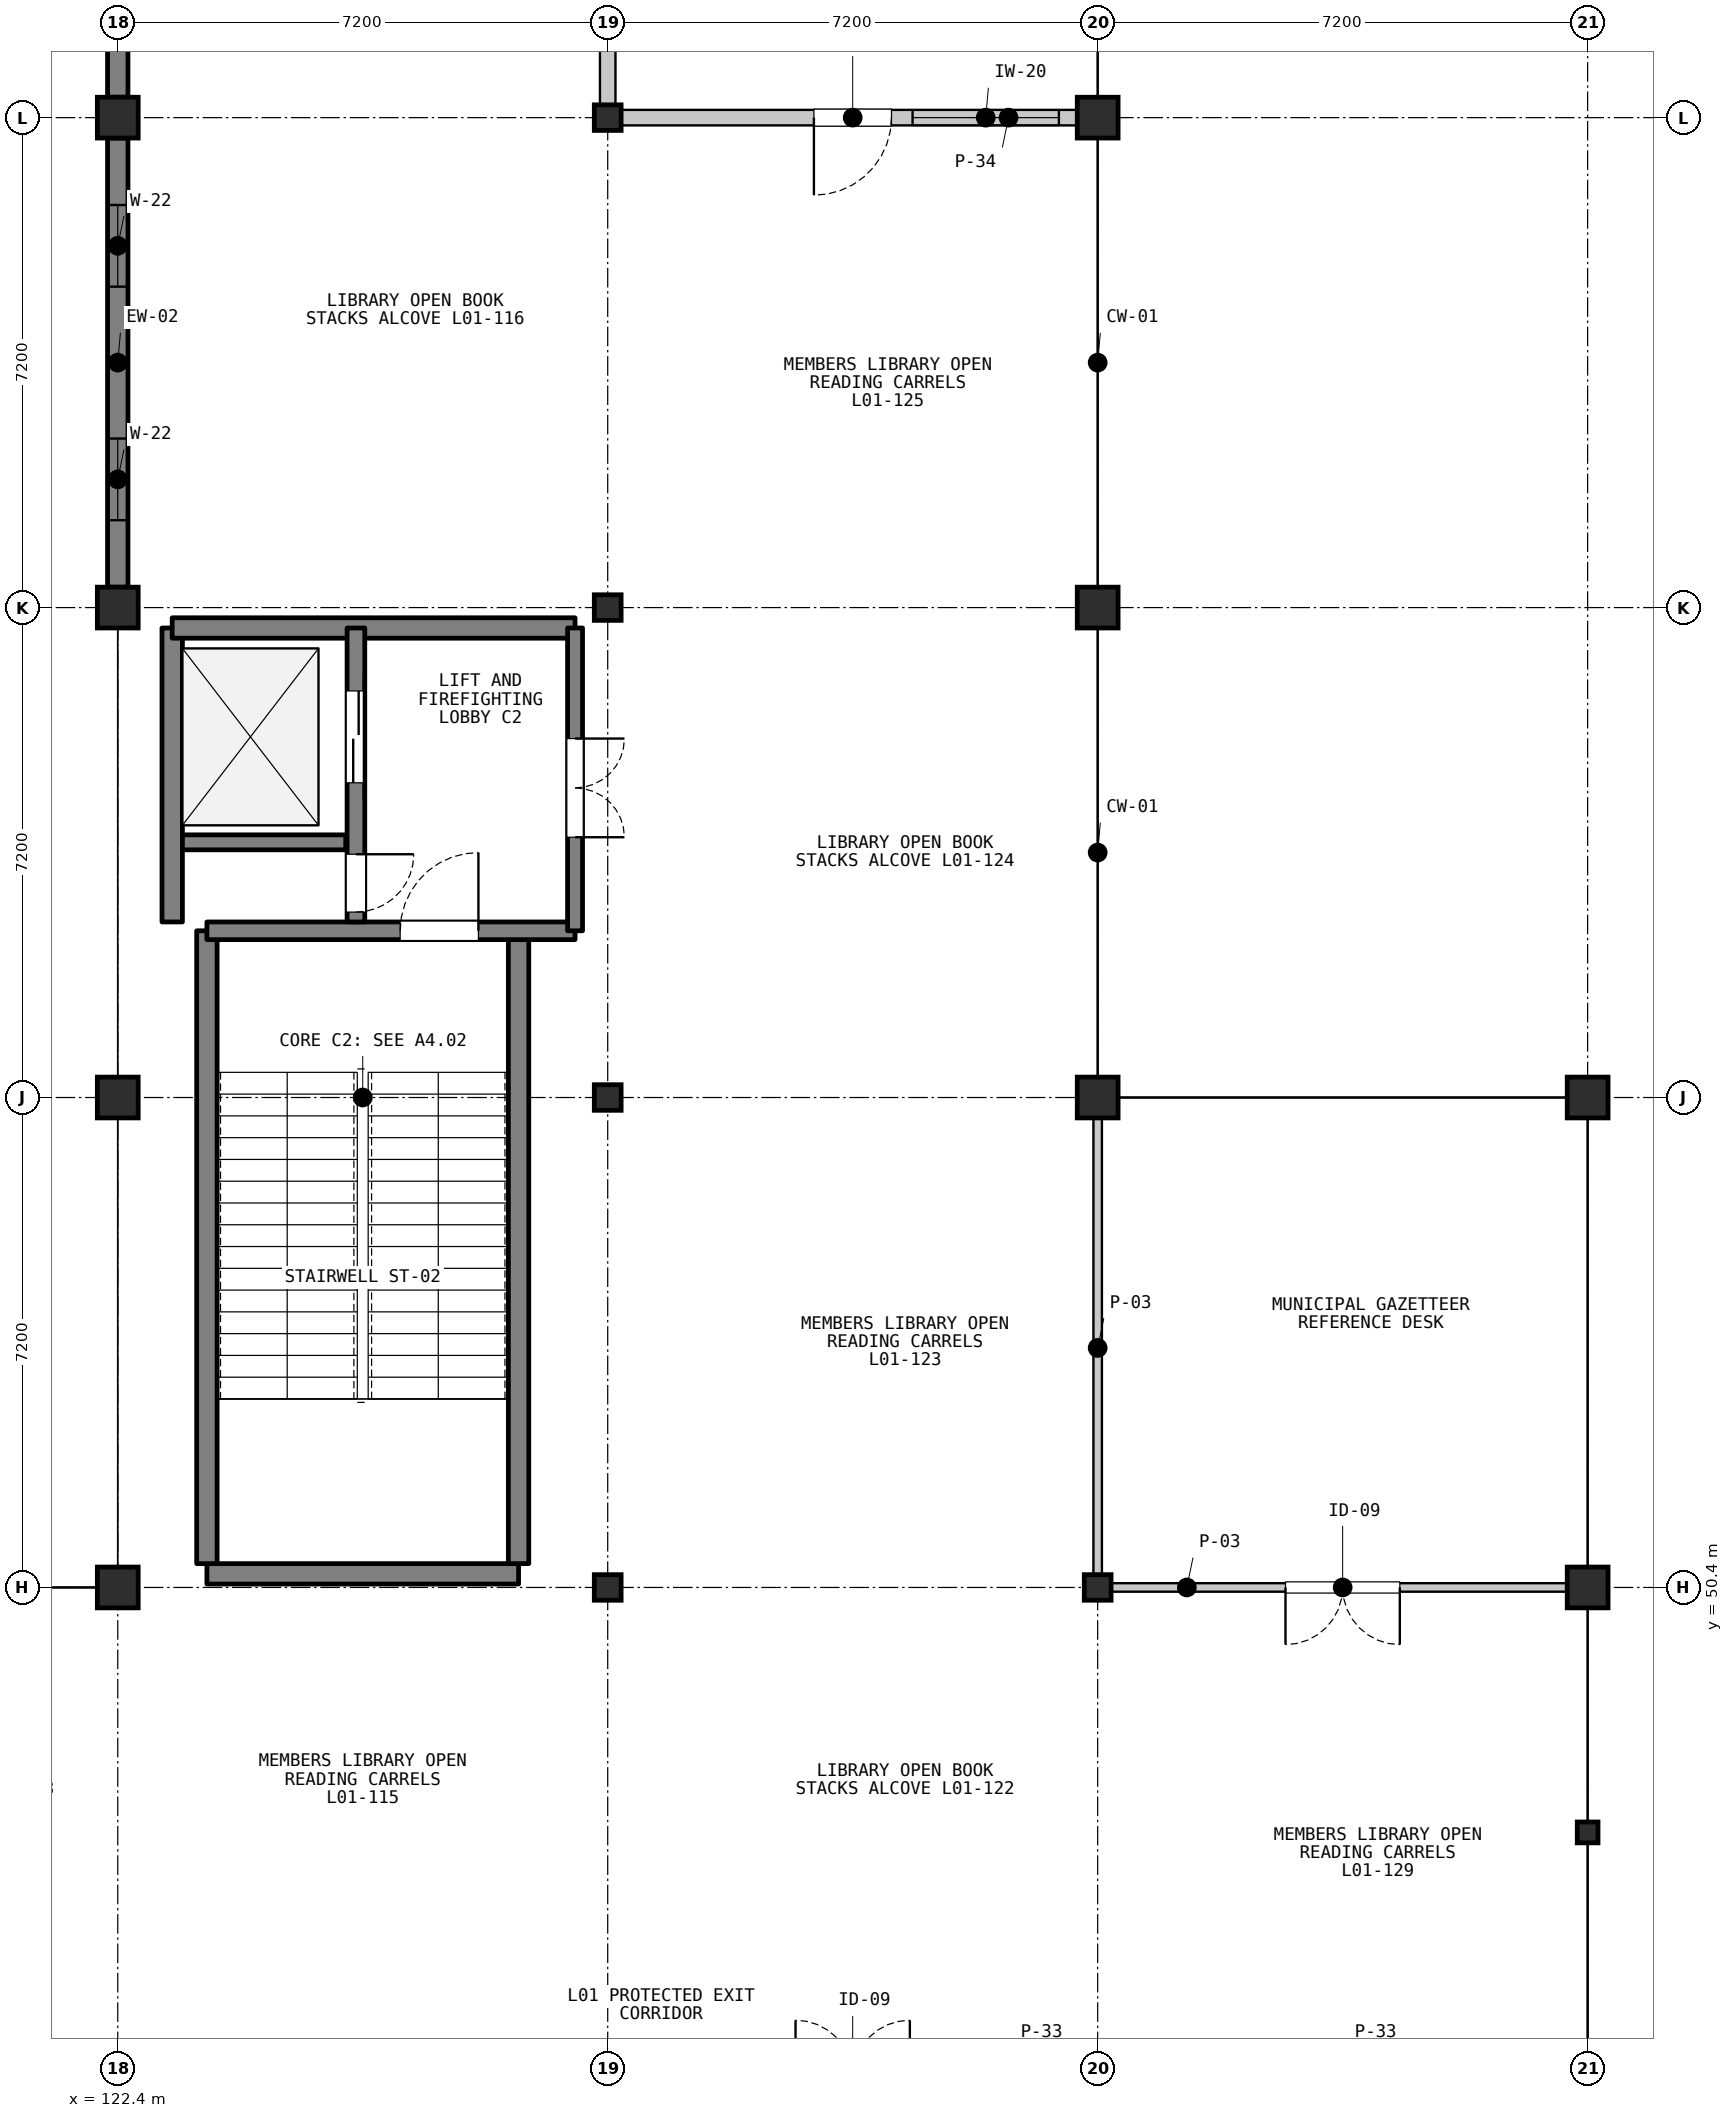
"""IFC4 building model, lengths in metres.
Left out: names, types, materials, properties, quantities, classifications, styles, units other than length and angle.
Written with IfcOpenShell. Run it as: python <this file> out.ifc"""

import sys

from ifc_helpers import new_model, si_unit, direction, frame, frame_2d, origin, origin_2d, place, context, subcontext, project, spatial, rectangle, i_section, extrude, element, fill, save


model = new_model("IFC4")
c1 = context("Model", 3, precision=1e-05, world=origin(), true_north=direction((0.0, 1.0)))
c2 = subcontext(c1, "Body", "Model", "MODEL_VIEW")
j1 = project(units=[si_unit("LENGTHUNIT", "METRE"), si_unit("PLANEANGLEUNIT", "RADIAN")], contexts=[c1])
p1 = place(None, origin())
s1 = spatial("IfcSite", under=j1, at=p1, CompositionType="ELEMENT")
p2 = place(p1, origin())
s2 = spatial("IfcBuilding", under=s1, at=p2, CompositionType="ELEMENT")
p3 = place(p2, origin())
s3 = spatial("IfcBuildingStorey", under=s2, at=p3, CompositionType="ELEMENT", Elevation=0.0)
for number, where, z_axis, x_axis in (
    (1, (122.4, 50.4, 0.0), (0.0, 0.0, 1.0), (1.0, 0.0, 0.0)),
    (2, (122.4, 57.6, 0.0), (0.0, 0.0, 1.0), (1.0, 0.0, 0.0)),
    (3, (122.4, 64.8, 0.0), (0.0, 0.0, 1.0), (1.0, 0.0, 0.0)),
    (4, (122.4, 72.0, 0.0), (0.0, 0.0, 1.0), (1.0, 0.0, 0.0)),
):
    element("IfcColumn", number, at=place(p3, frame(where, z_axis=z_axis, x_axis=x_axis)), inside=s3, PredefinedType="COLUMN", context=c2, shape_type="SweptSolid", body=[
        extrude(rectangle(XDim=0.6, YDim=0.6, at=origin_2d()), origin(), (0.0, 0.0, 1.0), 5.4),
    ])
for number, where, z_axis, x_axis in (
    (5, (129.6, 50.4, 0.0), (0.0, 0.0, 1.0), (1.0, 0.0, 0.0)),
    (6, (129.6, 57.6, 0.0), (0.0, 0.0, 1.0), (1.0, 0.0, 0.0)),
    (7, (129.6, 64.8, 0.0), (0.0, 0.0, 1.0), (1.0, 0.0, 0.0)),
    (8, (129.6, 72.0, 0.0), (0.0, 0.0, 1.0), (1.0, 0.0, 0.0)),
    (9, (136.8, 50.4, 0.0), (0.0, 0.0, 1.0), (1.0, 0.0, 0.0)),
):
    element("IfcColumn", number, at=place(p3, frame(where, z_axis=z_axis, x_axis=x_axis)), inside=s3, PredefinedType="COLUMN", context=c2, shape_type="SweptSolid", body=[
        extrude(i_section(OverallWidth=0.394, OverallDepth=0.376, WebThickness=0.017, FlangeThickness=0.028, FilletRadius=0.015, at=origin_2d()), origin(), (0.0, 0.0, 1.0), 5.4),
    ])
for number, where, z_axis, x_axis in (
    (10, (136.8, 57.6, 0.0), (0.0, 0.0, 1.0), (1.0, 0.0, 0.0)),
    (11, (136.8, 64.8, 0.0), (0.0, 0.0, 1.0), (1.0, 0.0, 0.0)),
    (12, (136.8, 72.0, 0.0), (0.0, 0.0, 1.0), (1.0, 0.0, 0.0)),
    (13, (144.0, 50.4, 0.0), (0.0, 0.0, 1.0), (1.0, 0.0, 0.0)),
    (14, (144.0, 57.6, 0.0), (0.0, 0.0, 1.0), (1.0, 0.0, 0.0)),
):
    element("IfcColumn", number, at=place(p3, frame(where, z_axis=z_axis, x_axis=x_axis)), inside=s3, PredefinedType="COLUMN", context=c2, shape_type="SweptSolid", body=[
        extrude(rectangle(XDim=0.6, YDim=0.6, at=origin_2d()), origin(), (0.0, 0.0, 1.0), 5.4),
    ])
p4 = place(p3, frame((144.0, 46.8, 0.0), z_axis=(0.0, 0.0, 1.0), x_axis=(1.0, 0.0, 0.0)))
e15 = element("IfcColumn", 15, at=p4, inside=s3, PredefinedType="PILASTER", context=c2, shape_type="SweptSolid", body=[
    extrude(i_section(OverallWidth=0.305, OverallDepth=0.307, WebThickness=0.01, FlangeThickness=0.015, FilletRadius=0.015, at=origin_2d()), origin(), (0.0, 0.0, 1.0), 5.4),
])
p5 = place(p3, frame((122.4, 65.1, 0.0), z_axis=(0.0, 0.0, 1.0), x_axis=(0.0, 1.0, 0.0)))
e16 = element("IfcWall", 16, at=p5, inside=s3, PredefinedType="SOLIDWALL", context=c2, shape_type="SweptSolid", body=[
    extrude(rectangle(XDim=6.6, YDim=0.3, at=frame_2d((3.3, 0.0))), origin(), (0.0, 0.0, 1.0), 4.667),
])
p6 = place(p5, frame((0.984, 0.0, 0.95)))
e17 = element("IfcOpeningElement", 17, at=p6, cuts=e16, PredefinedType="OPENING", context=c2, shape_type="SweptSolid", body=[
    extrude(rectangle(XDim=1.2, YDim=1.7, at=frame_2d((0.6, 0.85))), frame((0.0, 0.16, 0.0), z_axis=(0.0, -1.0, 0.0), x_axis=(1.0, 0.0, 0.0)), (0.0, 0.0, 1.0), 0.32),
])
p7 = place(p5, frame((4.416, 0.0, 0.95)))
e18 = element("IfcOpeningElement", 18, at=p7, cuts=e16, PredefinedType="OPENING", context=c2, shape_type="SweptSolid", body=[
    extrude(rectangle(XDim=1.2, YDim=1.7, at=frame_2d((0.6, 0.85))), frame((0.0, 0.16, 0.0), z_axis=(0.0, -1.0, 0.0), x_axis=(1.0, 0.0, 0.0)), (0.0, 0.0, 1.0), 0.32),
])
p8 = place(p3, frame((122.4, 72.3, 0.0), z_axis=(0.0, 0.0, 1.0), x_axis=(0.0, 1.0, 0.0)))
e19 = element("IfcWall", 19, at=p8, inside=s3, PredefinedType="SOLIDWALL", context=c2, shape_type="SweptSolid", body=[
    extrude(rectangle(XDim=6.6, YDim=0.3, at=frame_2d((3.3, 0.0))), origin(), (0.0, 0.0, 1.0), 4.667),
])
p9 = place(p8, frame((0.984, 0.0, 0.95)))
e20 = element("IfcOpeningElement", 20, at=p9, cuts=e19, PredefinedType="OPENING", context=c2, shape_type="SweptSolid", body=[
    extrude(rectangle(XDim=1.2, YDim=1.7, at=frame_2d((0.6, 0.85))), frame((0.0, 0.16, 0.0), z_axis=(0.0, -1.0, 0.0), x_axis=(1.0, 0.0, 0.0)), (0.0, 0.0, 1.0), 0.32),
])
p10 = place(p8, frame((4.416, 0.0, 0.95)))
e21 = element("IfcOpeningElement", 21, at=p10, cuts=e19, PredefinedType="OPENING", context=c2, shape_type="SweptSolid", body=[
    extrude(rectangle(XDim=1.2, YDim=1.7, at=frame_2d((0.6, 0.85))), frame((0.0, 0.16, 0.0), z_axis=(0.0, -1.0, 0.0), x_axis=(1.0, 0.0, 0.0)), (0.0, 0.0, 1.0), 0.32),
])
p11 = place(p3, frame((123.71, 50.6, 0.0), z_axis=(0.0, 0.0, 1.0), x_axis=(1.0, 0.0, 0.0)))
e22 = element("IfcWall", 22, at=p11, inside=s3, PredefinedType="SHEAR", context=c2, shape_type="SweptSolid", body=[
    extrude(rectangle(XDim=4.58, YDim=0.3, at=frame_2d((2.29, 0.0))), origin(), (0.0, 0.0, 1.0), 5.2),
])
for number, where, z_axis, x_axis in (
    (23, (123.71, 50.75, 0.0), (0.0, 0.0, 1.0), (0.0, 1.0, 0.0)),
    (24, (128.29, 50.75, 0.0), (0.0, 0.0, 1.0), (0.0, 1.0, 0.0)),
):
    element("IfcWall", number, at=place(p3, frame(where, z_axis=z_axis, x_axis=x_axis)), inside=s3, PredefinedType="SHEAR", context=c2, shape_type="SweptSolid", body=[
        extrude(rectangle(XDim=9.3, YDim=0.3, at=frame_2d((4.65, 0.0))), origin(), (0.0, 0.0, 1.0), 5.2),
    ])
p12 = place(p3, frame((123.71, 60.05, 0.0), z_axis=(0.0, 0.0, 1.0), x_axis=(1.0, 0.0, 0.0)))
e25 = element("IfcWall", 25, at=p12, inside=s3, PredefinedType="SHEAR", context=c2, shape_type="SweptSolid", body=[
    extrude(rectangle(XDim=5.41, YDim=0.26, at=frame_2d((2.705, 0.0))), origin(), (0.0, 0.0, 1.0), 5.2),
])
p13 = place(p12, frame((2.84, 0.0, 0.0)))
e26 = element("IfcOpeningElement", 26, at=p13, cuts=e25, PredefinedType="OPENING", context=c2, shape_type="SweptSolid", body=[
    extrude(rectangle(XDim=1.15, YDim=2.15, at=frame_2d((0.575, 1.075))), frame((0.0, 0.14, 0.0), z_axis=(0.0, -1.0, 0.0), x_axis=(1.0, 0.0, 0.0)), (0.0, 0.0, 1.0), 0.28),
])
p14 = place(p3, frame((123.2, 60.18, 0.0), z_axis=(0.0, 0.0, 1.0), x_axis=(0.0, 1.0, 0.0)))
e27 = element("IfcWall", 27, at=p14, inside=s3, PredefinedType="SHEAR", context=c2, shape_type="SweptSolid", body=[
    extrude(rectangle(XDim=4.32, YDim=0.3, at=frame_2d((2.16, 0.0))), origin(), (0.0, 0.0, 1.0), 5.2),
])
p15 = place(p3, frame((123.2, 64.5, 0.0), z_axis=(0.0, 0.0, 1.0), x_axis=(1.0, 0.0, 0.0)))
e28 = element("IfcWall", 28, at=p15, inside=s3, PredefinedType="SHEAR", context=c2, shape_type="SweptSolid", body=[
    extrude(rectangle(XDim=5.92, YDim=0.3, at=frame_2d((2.96, 0.0))), origin(), (0.0, 0.0, 1.0), 5.2),
])
p16 = place(p3, frame((123.35, 61.35, 0.0), z_axis=(0.0, 0.0, 1.0), x_axis=(1.0, 0.0, 0.0)))
e29 = element("IfcWall", 29, at=p16, inside=s3, PredefinedType="SHEAR", context=c2, shape_type="SweptSolid", body=[
    extrude(rectangle(XDim=2.4, YDim=0.22, at=frame_2d((1.2, 0.0))), origin(), (0.0, 0.0, 1.0), 5.2),
])
p17 = place(p3, frame((125.9, 64.5, 0.0), z_axis=(0.0, 0.0, 1.0), x_axis=(0.0, -1.0, 0.0)))
e30 = element("IfcWall", 30, at=p17, inside=s3, PredefinedType="SHEAR", context=c2, shape_type="SweptSolid", body=[
    extrude(rectangle(XDim=4.32, YDim=0.26, at=frame_2d((2.16, 0.0))), origin(), (0.0, 0.0, 1.0), 5.2),
])
p18 = place(p17, frame((0.925, 0.0, 0.0)))
e31 = element("IfcOpeningElement", 31, at=p18, cuts=e30, PredefinedType="OPENING", context=c2, shape_type="SweptSolid", body=[
    extrude(rectangle(XDim=1.35, YDim=2.2, at=frame_2d((0.675, 1.1))), frame((0.0, 0.14, 0.0), z_axis=(0.0, -1.0, 0.0), x_axis=(1.0, 0.0, 0.0)), (0.0, 0.0, 1.0), 0.28),
])
p19 = place(p17, frame((3.325, 0.0, 0.0)))
e32 = element("IfcOpeningElement", 32, at=p19, cuts=e30, PredefinedType="OPENING", context=c2, shape_type="SweptSolid", body=[
    extrude(rectangle(XDim=0.85, YDim=2.05, at=frame_2d((0.425, 1.025))), frame((0.0, 0.14, 0.0), z_axis=(0.0, -1.0, 0.0), x_axis=(1.0, 0.0, 0.0)), (0.0, 0.0, 1.0), 0.28),
])
p20 = place(p3, frame((129.12, 64.5, 0.0), z_axis=(0.0, 0.0, 1.0), x_axis=(0.0, -1.0, 0.0)))
e33 = element("IfcWall", 33, at=p20, inside=s3, PredefinedType="SHEAR", context=c2, shape_type="SweptSolid", body=[
    extrude(rectangle(XDim=4.45, YDim=0.22, at=frame_2d((2.225, 0.0))), origin(), (0.0, 0.0, 1.0), 5.2),
])
p21 = place(p20, frame((1.625, 0.0, 0.0)))
e34 = element("IfcOpeningElement", 34, at=p21, cuts=e33, PredefinedType="OPENING", context=c2, shape_type="SweptSolid", body=[
    extrude(rectangle(XDim=1.45, YDim=2.2, at=frame_2d((0.725, 1.1))), frame((0.0, 0.12, 0.0), z_axis=(0.0, -1.0, 0.0), x_axis=(1.0, 0.0, 0.0)), (0.0, 0.0, 1.0), 0.24),
])
p22 = place(p3, frame((136.68, 72.0, 0.0), z_axis=(0.0, 0.0, 1.0), x_axis=(-1.0, 0.0, 0.0)))
e35 = element("IfcWall", 35, at=p22, inside=s3, PredefinedType="PARTITIONING", context=c2, shape_type="SweptSolid", body=[
    extrude(rectangle(XDim=6.96, YDim=0.228, at=frame_2d((3.48, 0.0))), origin(), (0.0, 0.0, 1.0), 4.428),
])
p23 = place(p22, frame((2.91, 0.0, 0.0)))
e36 = element("IfcOpeningElement", 36, at=p23, cuts=e35, PredefinedType="OPENING", context=c2, shape_type="SweptSolid", body=[
    extrude(rectangle(XDim=1.14, YDim=2.18, at=frame_2d((0.57, 1.09))), frame((0.0, 0.124, 0.0), z_axis=(0.0, -1.0, 0.0), x_axis=(1.0, 0.0, 0.0)), (0.0, 0.0, 1.0), 0.248),
])
p24 = place(p22, frame((0.45, 0.0, 1.05)))
e37 = element("IfcOpeningElement", 37, at=p24, cuts=e35, PredefinedType="OPENING", context=c2, shape_type="SweptSolid", body=[
    extrude(rectangle(XDim=2.15, YDim=1.26, at=frame_2d((1.075, 0.63))), frame((0.0, 0.124, 0.0), z_axis=(0.0, -1.0, 0.0), x_axis=(1.0, 0.0, 0.0)), (0.0, 0.0, 1.0), 0.248),
])
p25 = place(p3, frame((129.6, 72.12, 0.0), z_axis=(0.0, 0.0, 1.0), x_axis=(0.0, 1.0, 0.0)))
e38 = element("IfcWall", 38, at=p25, inside=s3, PredefinedType="PARTITIONING", context=c2, shape_type="SweptSolid", body=[
    extrude(rectangle(XDim=6.96, YDim=0.228, at=frame_2d((3.48, 0.0))), origin(), (0.0, 0.0, 1.0), 4.428),
])
p26 = place(p3, frame((143.88, 50.4, 0.0), z_axis=(0.0, 0.0, 1.0), x_axis=(-1.0, 0.0, 0.0)))
e39 = element("IfcWall", 39, at=p26, inside=s3, PredefinedType="PARTITIONING", context=c2, shape_type="SweptSolid", body=[
    extrude(rectangle(XDim=6.96, YDim=0.125, at=frame_2d((3.48, 0.0))), origin(), (0.0, 0.0, 1.0), 4.588),
])
p27 = place(p26, frame((2.64, 0.0, 0.0)))
e40 = element("IfcOpeningElement", 40, at=p27, cuts=e39, PredefinedType="OPENING", context=c2, shape_type="SweptSolid", body=[
    extrude(rectangle(XDim=1.68, YDim=2.35, at=frame_2d((0.84, 1.175))), frame((0.0, 0.073, 0.0), z_axis=(0.0, -1.0, 0.0), x_axis=(1.0, 0.0, 0.0)), (0.0, 0.0, 1.0), 0.145),
])
p28 = place(p3, frame((136.8, 50.52, 0.0), z_axis=(0.0, 0.0, 1.0), x_axis=(0.0, 1.0, 0.0)))
e41 = element("IfcWall", 41, at=p28, inside=s3, PredefinedType="PARTITIONING", context=c2, shape_type="SweptSolid", body=[
    extrude(rectangle(XDim=6.8, YDim=0.125, at=frame_2d((3.4, 0.0))), origin(), (0.0, 0.0, 1.0), 4.428),
])
p29 = place(p6, origin())
e42 = element("IfcWindow", 42, at=p29, inside=s3, PartitioningType="SINGLE_PANEL", PredefinedType="WINDOW", context=c2, shape_type="SweptSolid", body=[
    extrude(rectangle(XDim=1.2, YDim=1.7, at=frame_2d((0.6, 0.85))), frame((0.0, 0.03, 0.0), z_axis=(0.0, -1.0, 0.0), x_axis=(1.0, 0.0, 0.0)), (0.0, 0.0, 1.0), 0.06),
])
fill(e17, e42)
p30 = place(p7, origin())
e43 = element("IfcWindow", 43, at=p30, inside=s3, PartitioningType="SINGLE_PANEL", PredefinedType="WINDOW", context=c2, shape_type="SweptSolid", body=[
    extrude(rectangle(XDim=1.2, YDim=1.7, at=frame_2d((0.6, 0.85))), frame((0.0, 0.03, 0.0), z_axis=(0.0, -1.0, 0.0), x_axis=(1.0, 0.0, 0.0)), (0.0, 0.0, 1.0), 0.06),
])
fill(e18, e43)
p31 = place(p13, origin())
e44 = element("IfcDoor", 44, at=p31, inside=s3, OperationType="SINGLE_SWING_RIGHT", PredefinedType="DOOR", context=c2, shape_type="SweptSolid", body=[
    extrude(rectangle(XDim=1.15, YDim=2.15, at=frame_2d((0.575, 1.075))), frame((0.0, 0.025, 0.0), z_axis=(0.0, -1.0, 0.0), x_axis=(1.0, 0.0, 0.0)), (0.0, 0.0, 1.0), 0.05),
])
fill(e26, e44)
p32 = place(p18, origin())
e45 = element("IfcDoor", 45, at=p32, inside=s3, OperationType="DOUBLE_DOOR_SLIDING", PredefinedType="DOOR", context=c2, shape_type="SweptSolid", body=[
    extrude(rectangle(XDim=1.35, YDim=2.2, at=frame_2d((0.675, 1.1))), frame((0.0, 0.025, 0.0), z_axis=(0.0, -1.0, 0.0), x_axis=(1.0, 0.0, 0.0)), (0.0, 0.0, 1.0), 0.05),
])
fill(e31, e45)
p33 = place(p19, origin())
e46 = element("IfcDoor", 46, at=p33, inside=s3, OperationType="SINGLE_SWING_LEFT", PredefinedType="DOOR", context=c2, shape_type="SweptSolid", body=[
    extrude(rectangle(XDim=0.85, YDim=2.05, at=frame_2d((0.425, 1.025))), frame((0.0, 0.025, 0.0), z_axis=(0.0, -1.0, 0.0), x_axis=(1.0, 0.0, 0.0)), (0.0, 0.0, 1.0), 0.05),
])
fill(e32, e46)
p34 = place(p21, origin())
e47 = element("IfcDoor", 47, at=p34, inside=s3, OperationType="DOUBLE_DOOR_SINGLE_SWING", PredefinedType="DOOR", context=c2, shape_type="SweptSolid", body=[
    extrude(rectangle(XDim=1.45, YDim=2.2, at=frame_2d((0.725, 1.1))), frame((0.0, 0.025, 0.0), z_axis=(0.0, -1.0, 0.0), x_axis=(1.0, 0.0, 0.0)), (0.0, 0.0, 1.0), 0.05),
])
fill(e34, e47)
p35 = place(p23, origin())
e48 = element("IfcDoor", 48, at=p35, inside=s3, OperationType="SINGLE_SWING_RIGHT", PredefinedType="DOOR", context=c2, shape_type="SweptSolid", body=[
    extrude(rectangle(XDim=1.14, YDim=2.18, at=frame_2d((0.57, 1.09))), frame((0.0, 0.025, 0.0), z_axis=(0.0, -1.0, 0.0), x_axis=(1.0, 0.0, 0.0)), (0.0, 0.0, 1.0), 0.05),
])
fill(e36, e48)
p36 = place(p24, origin())
e49 = element("IfcWindow", 49, at=p36, inside=s3, PartitioningType="SINGLE_PANEL", PredefinedType="WINDOW", context=c2, shape_type="SweptSolid", body=[
    extrude(rectangle(XDim=2.15, YDim=1.26, at=frame_2d((1.075, 0.63))), frame((0.0, 0.03, 0.0), z_axis=(0.0, -1.0, 0.0), x_axis=(1.0, 0.0, 0.0)), (0.0, 0.0, 1.0), 0.06),
])
fill(e37, e49)
p37 = place(p27, origin())
e50 = element("IfcDoor", 50, at=p37, inside=s3, OperationType="DOUBLE_DOOR_SINGLE_SWING", PredefinedType="DOOR", context=c2, shape_type="SweptSolid", body=[
    extrude(rectangle(XDim=1.68, YDim=2.35, at=frame_2d((0.84, 1.175))), frame((0.0, 0.025, 0.0), z_axis=(0.0, -1.0, 0.0), x_axis=(1.0, 0.0, 0.0)), (0.0, 0.0, 1.0), 0.05),
])
fill(e40, e50)
save(model, sys.argv[1])
